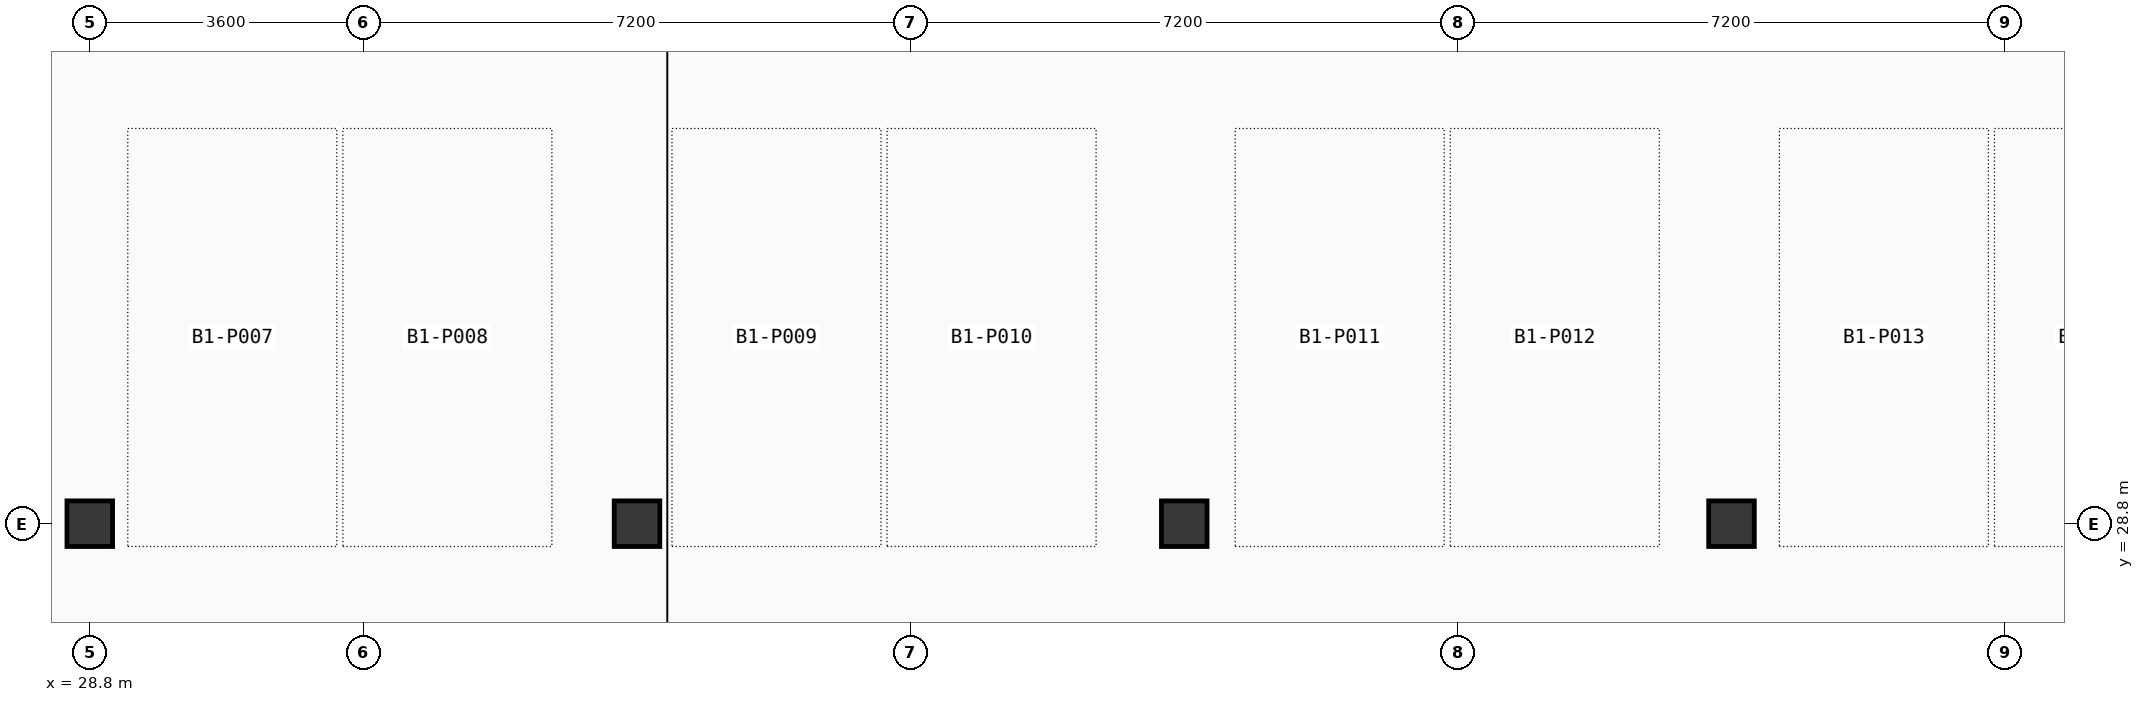
"""IFC4 building model, lengths in metres.
Left out: names, types, materials, properties, quantities, classifications, styles, units other than length and angle.
Written with IfcOpenShell. Run it as: python <this file> out.ifc"""

import sys

from ifc_helpers import new_model, si_unit, direction, frame, origin, origin_2d, place, context, subcontext, project, spatial, rectangle, extrude, element, save


model = new_model("IFC4")
c1 = context("Model", 3, precision=1e-05, world=origin(), true_north=direction((0.0, 1.0)))
c2 = subcontext(c1, "Body", "Model", "MODEL_VIEW")
j1 = project(units=[si_unit("LENGTHUNIT", "METRE"), si_unit("PLANEANGLEUNIT", "RADIAN")], contexts=[c1])
p1 = place(None, origin())
s1 = spatial("IfcSite", under=j1, at=p1, CompositionType="ELEMENT")
p2 = place(p1, origin())
s2 = spatial("IfcBuilding", under=s1, at=p2, CompositionType="ELEMENT")
p3 = place(p2, frame((0.0, 0.0, -4.2)))
s3 = spatial("IfcBuildingStorey", under=s2, at=p3, CompositionType="ELEMENT", Elevation=-4.2)
for number, where, z_axis, x_axis in (
    (1, (28.8, 28.8, 0.0), (0.0, 0.0, 1.0), (1.0, 0.0, 0.0)),
    (2, (36.0, 28.8, 0.0), (0.0, 0.0, 1.0), (1.0, 0.0, 0.0)),
    (3, (43.2, 28.8, 0.0), (0.0, 0.0, 1.0), (1.0, 0.0, 0.0)),
    (4, (50.4, 28.8, 0.0), (0.0, 0.0, 1.0), (1.0, 0.0, 0.0)),
):
    element("IfcColumn", number, at=place(p3, frame(where, z_axis=z_axis, x_axis=x_axis)), inside=s3, PredefinedType="COLUMN", context=c2, shape_type="SweptSolid", body=[
        extrude(rectangle(XDim=0.6, YDim=0.6, at=origin_2d()), origin(), (0.0, 0.0, 1.0), 4.2),
    ])
save(model, sys.argv[1])
